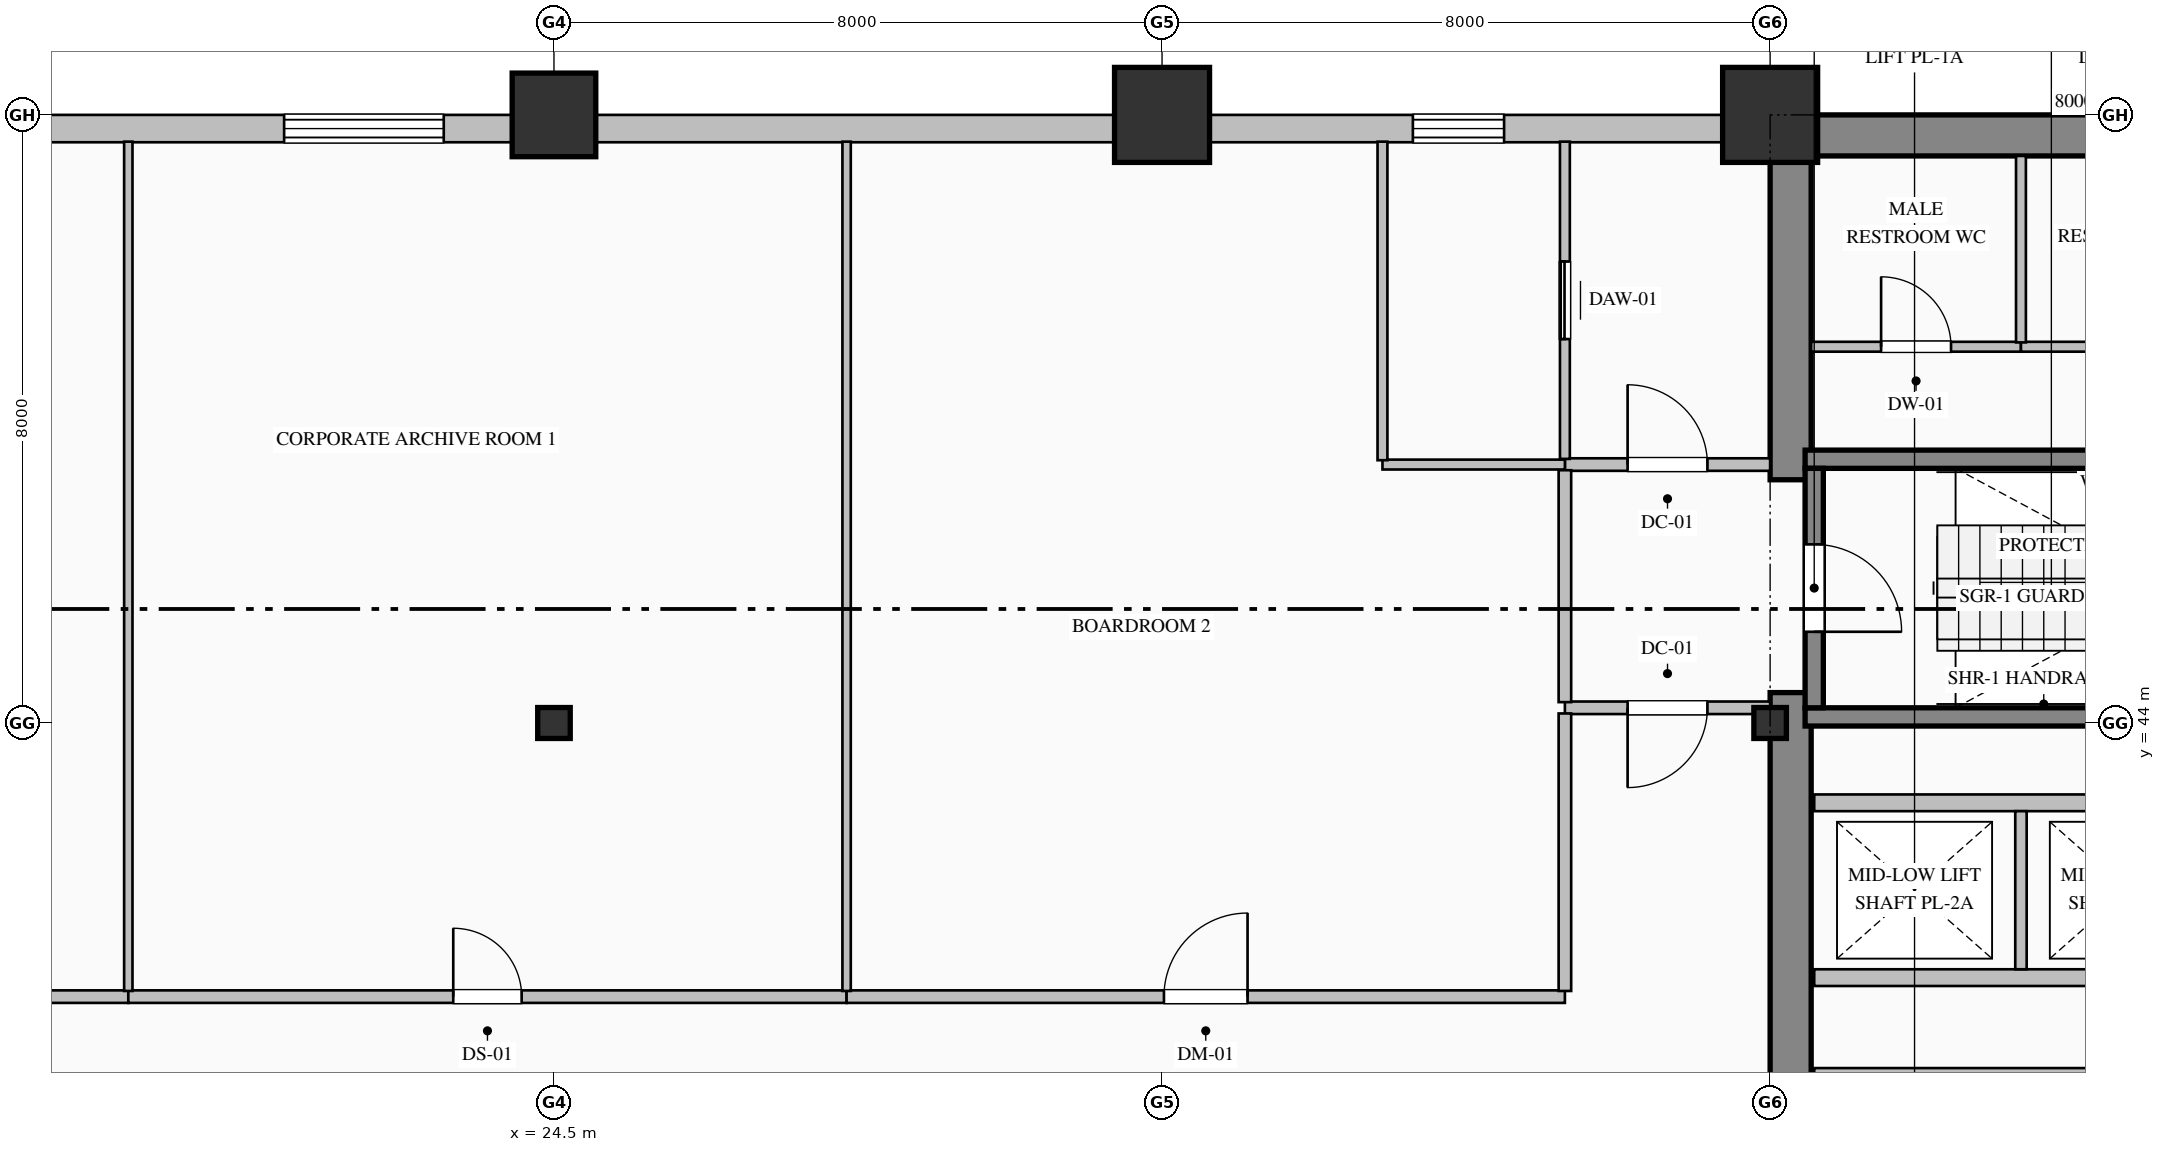
"""IFC4 building model, lengths in metres.
Left out: names, types, materials, properties, quantities, classifications, styles, units other than length and angle.
Written with IfcOpenShell. Run it as: python <this file> out.ifc"""

import sys

from ifc_helpers import new_model, si_unit, direction, frame, frame_2d, origin, origin_2d, place, context, subcontext, project, spatial, rectangle, hollow_rectangle, i_section, extrude, element, fill, save


model = new_model("IFC4")
c1 = context("Model", 3, precision=1e-05, world=origin(), true_north=direction((0.0, 1.0)))
c2 = subcontext(c1, "Body", "Model", "MODEL_VIEW")
j1 = project(units=[si_unit("LENGTHUNIT", "METRE"), si_unit("PLANEANGLEUNIT", "RADIAN")], contexts=[c1])
p1 = place(None, origin())
s1 = spatial("IfcSite", under=j1, at=p1, CompositionType="ELEMENT")
p2 = place(p1, origin())
s2 = spatial("IfcBuilding", under=s1, at=p2, CompositionType="ELEMENT")
p3 = place(p2, frame((0.0, 0.0, 104.2)))
s3 = spatial("IfcBuildingStorey", under=s2, at=p3, CompositionType="ELEMENT", Elevation=104.2)
p4 = place(p3, frame((40.5, 51.73, 0.0), z_axis=(0.0, 0.0, 1.0), x_axis=(1.0, 0.0, 0.0)))
e1 = element("IfcWall", 1, at=p4, inside=s3, PredefinedType="SHEAR", context=c2, shape_type="SweptSolid", body=[
    extrude(rectangle(XDim=23.5, YDim=0.54, at=frame_2d((11.75, 0.0))), origin(), (0.0, 0.0, 1.0), 3.65),
])
p5 = place(p3, frame((40.77, 36.54, 0.0), z_axis=(0.0, 0.0, 1.0), x_axis=(0.0, 1.0, 0.0)))
e2 = element("IfcWall", 2, at=p5, inside=s3, PredefinedType="SHEAR", context=c2, shape_type="SweptSolid", body=[
    extrude(rectangle(XDim=7.86, YDim=0.54, at=frame_2d((3.93, 0.0))), origin(), (0.0, 0.0, 1.0), 3.65),
])
p6 = place(p3, frame((40.77, 47.2, 0.0), z_axis=(0.0, 0.0, 1.0), x_axis=(0.0, 1.0, 0.0)))
e3 = element("IfcWall", 3, at=p6, inside=s3, PredefinedType="SHEAR", context=c2, shape_type="SweptSolid", body=[
    extrude(rectangle(XDim=4.26, YDim=0.54, at=frame_2d((2.13, 0.0))), origin(), (0.0, 0.0, 1.0), 3.65),
])
p7 = place(p3, frame((24.5, 44.0, 0.0), z_axis=(0.0, 0.0, 1.0), x_axis=(1.0, 0.0, 0.0)))
e4 = element("IfcColumn", 4, at=p7, inside=s3, PredefinedType="COLUMN", context=c2, shape_type="SweptSolid", body=[
    extrude(i_section(OverallWidth=0.407, OverallDepth=0.428, WebThickness=0.02, FlangeThickness=0.035, FilletRadius=0.022, at=origin_2d()), origin(), (0.0, 0.0, 1.0), 4.0),
])
p8 = place(p3, frame((24.5, 52.0, 0.0), z_axis=(0.0, 0.0, 1.0), x_axis=(1.0, 0.0, 0.0)))
e5 = element("IfcColumn", 5, at=p8, inside=s3, PredefinedType="COLUMN", context=c2, shape_type="SweptSolid", body=[
    extrude(hollow_rectangle(XDim=1.1, YDim=1.1, WallThickness=0.04, at=origin_2d()), origin(), (0.0, 0.0, 1.0), 4.0),
])
p9 = place(p3, frame((32.5, 52.0, 0.0), z_axis=(0.0, 0.0, 1.0), x_axis=(1.0, 0.0, 0.0)))
e6 = element("IfcColumn", 6, at=p9, inside=s3, PredefinedType="COLUMN", context=c2, shape_type="SweptSolid", body=[
    extrude(hollow_rectangle(XDim=1.25, YDim=1.25, WallThickness=0.045, at=origin_2d()), origin(), (0.0, 0.0, 1.0), 4.0),
])
p10 = place(p3, frame((40.5, 44.0, 0.0), z_axis=(0.0, 0.0, 1.0), x_axis=(1.0, 0.0, 0.0)))
e7 = element("IfcColumn", 7, at=p10, inside=s3, PredefinedType="COLUMN", context=c2, shape_type="SweptSolid", body=[
    extrude(i_section(OverallWidth=0.407, OverallDepth=0.428, WebThickness=0.02, FlangeThickness=0.035, FilletRadius=0.022, at=origin_2d()), origin(), (0.0, 0.0, 1.0), 4.0),
])
p11 = place(p3, frame((40.5, 52.0, 0.0), z_axis=(0.0, 0.0, 1.0), x_axis=(1.0, 0.0, 0.0)))
e8 = element("IfcColumn", 8, at=p11, inside=s3, PredefinedType="COLUMN", context=c2, shape_type="SweptSolid", body=[
    extrude(hollow_rectangle(XDim=1.25, YDim=1.25, WallThickness=0.045, at=origin_2d()), origin(), (0.0, 0.0, 1.0), 4.0),
])
p12 = place(p3, frame((4.0, 51.82, 0.0), z_axis=(0.0, 0.0, 1.0), x_axis=(1.0, 0.0, 0.0)))
e9 = element("IfcWall", 9, at=p12, inside=s3, PredefinedType="SOLIDWALL", context=c2, shape_type="SweptSolid", body=[
    extrude(rectangle(XDim=36.52, YDim=0.36, at=frame_2d((18.26, 0.0))), origin(), (0.0, 0.0, 1.0), 3.15),
])
p13 = place(p12, frame((6.15, 0.0, 0.85)))
e10 = element("IfcOpeningElement", 10, at=p13, cuts=e9, PredefinedType="OPENING", context=c2, shape_type="SweptSolid", body=[
    extrude(rectangle(XDim=2.1, YDim=2.05, at=frame_2d((1.05, 1.025))), frame((0.0, 0.19, 0.0), z_axis=(0.0, -1.0, 0.0), x_axis=(1.0, 0.0, 0.0)), (0.0, 0.0, 1.0), 0.38),
])
p14 = place(p12, frame((10.2, 0.0, 0.7)))
e11 = element("IfcOpeningElement", 11, at=p14, cuts=e9, PredefinedType="OPENING", context=c2, shape_type="SweptSolid", body=[
    extrude(rectangle(XDim=1.2, YDim=1.85, at=frame_2d((0.6, 0.925))), frame((0.0, 0.19, 0.0), z_axis=(0.0, -1.0, 0.0), x_axis=(1.0, 0.0, 0.0)), (0.0, 0.0, 1.0), 0.38),
])
p15 = place(p12, frame((16.95, 0.0, 0.85)))
e12 = element("IfcOpeningElement", 12, at=p15, cuts=e9, PredefinedType="OPENING", context=c2, shape_type="SweptSolid", body=[
    extrude(rectangle(XDim=2.1, YDim=2.05, at=frame_2d((1.05, 1.025))), frame((0.0, 0.19, 0.0), z_axis=(0.0, -1.0, 0.0), x_axis=(1.0, 0.0, 0.0)), (0.0, 0.0, 1.0), 0.38),
])
p16 = place(p12, frame((31.8, 0.0, 0.7)))
e13 = element("IfcOpeningElement", 13, at=p16, cuts=e9, PredefinedType="OPENING", context=c2, shape_type="SweptSolid", body=[
    extrude(rectangle(XDim=1.2, YDim=1.85, at=frame_2d((0.6, 0.925))), frame((0.0, 0.19, 0.0), z_axis=(0.0, -1.0, 0.0), x_axis=(1.0, 0.0, 0.0)), (0.0, 0.0, 1.0), 0.38),
])
for number, where, z_axis, x_axis in (
    (14, (40.96, 47.47, 0.0), (0.0, 0.0, 1.0), (1.0, 0.0, 0.0)),
    (15, (49.04, 44.08, 0.0), (0.0, 0.0, 1.0), (-1.0, 0.0, 0.0)),
):
    element("IfcWall", number, at=place(p3, frame(where, z_axis=z_axis, x_axis=x_axis)), inside=s3, PredefinedType="SOLIDWALL", context=c2, shape_type="SweptSolid", body=[
        extrude(rectangle(XDim=8.08, YDim=0.24, at=frame_2d((4.04, 0.0))), origin(), (0.0, 0.0, 1.0), 4.0),
    ])
p17 = place(p3, frame((41.08, 47.35, 0.0), z_axis=(0.0, 0.0, 1.0), x_axis=(0.0, -1.0, 0.0)))
e16 = element("IfcWall", 16, at=p17, inside=s3, PredefinedType="SOLIDWALL", context=c2, shape_type="SweptSolid", body=[
    extrude(rectangle(XDim=3.15, YDim=0.24, at=frame_2d((1.575, 0.0))), origin(), (0.0, 0.0, 1.0), 4.0),
])
p18 = place(p17, frame((1.0, 0.0, 0.0)))
e17 = element("IfcOpeningElement", 17, at=p18, cuts=e16, PredefinedType="OPENING", context=c2, shape_type="SweptSolid", body=[
    extrude(rectangle(XDim=1.15, YDim=2.2, at=frame_2d((0.575, 1.1))), frame((0.0, 0.13, 0.0), z_axis=(0.0, -1.0, 0.0), x_axis=(1.0, 0.0, 0.0)), (0.0, 0.0, 1.0), 0.26),
])
for number, where, z_axis, x_axis in (
    (18, (41.08, 39.35, 0.0), (0.0, 0.0, 1.0), (1.0, 0.0, 0.0)),
    (19, (49.32, 40.65, 0.0), (0.0, 0.0, 1.0), (-1.0, 0.0, 0.0)),
    (20, (41.08, 42.95, 0.0), (0.0, 0.0, 1.0), (1.0, 0.0, 0.0)),
):
    element("IfcWall", number, at=place(p3, frame(where, z_axis=z_axis, x_axis=x_axis)), inside=s3, PredefinedType="PARTITIONING", context=c2, shape_type="SweptSolid", body=[
        extrude(rectangle(XDim=8.24, YDim=0.22, at=frame_2d((4.12, 0.0))), origin(), (0.0, 0.0, 1.0), 3.65),
    ])
p19 = place(p3, frame((43.8, 40.76, 0.0), z_axis=(0.0, 0.0, 1.0), x_axis=(0.0, 1.0, 0.0)))
e21 = element("IfcWall", 21, at=p19, inside=s3, PredefinedType="PARTITIONING", context=c2, shape_type="SweptSolid", body=[
    extrude(rectangle(XDim=2.08, YDim=0.15, at=frame_2d((1.04, 0.0))), origin(), (0.0, 0.0, 1.0), 3.65),
])
p20 = place(p3, frame((37.8, 47.4, 0.0), z_axis=(0.0, 0.0, 1.0), x_axis=(1.0, 0.0, 0.0)))
e22 = element("IfcWall", 22, at=p20, inside=s3, PredefinedType="PARTITIONING", context=c2, shape_type="SweptSolid", body=[
    extrude(rectangle(XDim=2.7, YDim=0.165, at=frame_2d((1.35, 0.0))), origin(), (0.0, 0.0, 1.0), 3.65),
])
p21 = place(p20, frame((0.825, 0.0, 0.0)))
e23 = element("IfcOpeningElement", 23, at=p21, cuts=e22, PredefinedType="OPENING", context=c2, shape_type="SweptSolid", body=[
    extrude(rectangle(XDim=1.05, YDim=2.15, at=frame_2d((0.525, 1.075))), frame((0.0, 0.093, 0.0), z_axis=(0.0, -1.0, 0.0), x_axis=(1.0, 0.0, 0.0)), (0.0, 0.0, 1.0), 0.185),
])
p22 = place(p3, frame((40.5, 44.2, 0.0), z_axis=(0.0, 0.0, 1.0), x_axis=(-1.0, 0.0, 0.0)))
e24 = element("IfcWall", 24, at=p22, inside=s3, PredefinedType="PARTITIONING", context=c2, shape_type="SweptSolid", body=[
    extrude(rectangle(XDim=2.7, YDim=0.165, at=frame_2d((1.35, 0.0))), origin(), (0.0, 0.0, 1.0), 3.65),
])
p23 = place(p22, frame((0.825, 0.0, 0.0)))
e25 = element("IfcOpeningElement", 25, at=p23, cuts=e24, PredefinedType="OPENING", context=c2, shape_type="SweptSolid", body=[
    extrude(rectangle(XDim=1.05, YDim=2.15, at=frame_2d((0.525, 1.075))), frame((0.0, 0.093, 0.0), z_axis=(0.0, -1.0, 0.0), x_axis=(1.0, 0.0, 0.0)), (0.0, 0.0, 1.0), 0.185),
])
p24 = place(p3, frame((37.8, 44.274, 0.0), z_axis=(0.0, 0.0, 1.0), x_axis=(0.0, 1.0, 0.0)))
e26 = element("IfcWall", 26, at=p24, inside=s3, PredefinedType="PARTITIONING", context=c2, shape_type="SweptSolid", body=[
    extrude(rectangle(XDim=3.051, YDim=0.165, at=frame_2d((1.525, 0.0))), origin(), (0.0, 0.0, 1.0), 3.65),
])
p25 = place(p3, frame((37.8, 47.475, 0.0), z_axis=(0.0, 0.0, 1.0), x_axis=(0.0, 1.0, 0.0)))
e27 = element("IfcWall", 27, at=p25, inside=s3, PredefinedType="PARTITIONING", context=c2, shape_type="SweptSolid", body=[
    extrude(rectangle(XDim=4.173, YDim=0.13, at=frame_2d((2.087, 0.0))), origin(), (0.0, 0.0, 1.0), 3.65),
])
p26 = place(p25, frame((1.577, 0.0, 0.0)))
e28 = element("IfcOpeningElement", 28, at=p26, cuts=e27, PredefinedType="OPENING", context=c2, shape_type="SweptSolid", body=[
    extrude(rectangle(XDim=1.02, YDim=2.15, at=frame_2d((0.51, 1.075))), frame((0.0, 0.075, 0.0), z_axis=(0.0, -1.0, 0.0), x_axis=(1.0, 0.0, 0.0)), (0.0, 0.0, 1.0), 0.15),
])
p27 = place(p3, frame((37.8, 47.4, 0.0), z_axis=(0.0, 0.0, 1.0), x_axis=(-1.0, 0.0, 0.0)))
e29 = element("IfcWall", 29, at=p27, inside=s3, PredefinedType="PARTITIONING", context=c2, shape_type="SweptSolid", body=[
    extrude(rectangle(XDim=2.4, YDim=0.13, at=frame_2d((1.2, 0.0))), origin(), (0.0, 0.0, 1.0), 3.65),
])
p28 = place(p3, frame((35.4, 47.457, 0.0), z_axis=(0.0, 0.0, 1.0), x_axis=(0.0, 1.0, 0.0)))
e30 = element("IfcWall", 30, at=p28, inside=s3, PredefinedType="PARTITIONING", context=c2, shape_type="SweptSolid", body=[
    extrude(rectangle(XDim=4.191, YDim=0.13, at=frame_2d((2.095, 0.0))), origin(), (0.0, 0.0, 1.0), 3.65),
])
p29 = place(p3, frame((41.04, 48.95, 0.0), z_axis=(0.0, 0.0, 1.0), x_axis=(1.0, 0.0, 0.0)))
e31 = element("IfcWall", 31, at=p29, inside=s3, PredefinedType="PARTITIONING", context=c2, shape_type="SweptSolid", body=[
    extrude(rectangle(XDim=2.76, YDim=0.13, at=frame_2d((1.38, 0.0))), origin(), (0.0, 0.0, 1.0), 3.65),
])
p30 = place(p29, frame((0.92, 0.0, 0.0)))
e32 = element("IfcOpeningElement", 32, at=p30, cuts=e31, PredefinedType="OPENING", context=c2, shape_type="SweptSolid", body=[
    extrude(rectangle(XDim=0.92, YDim=2.15, at=frame_2d((0.46, 1.075))), frame((0.0, 0.075, 0.0), z_axis=(0.0, -1.0, 0.0), x_axis=(1.0, 0.0, 0.0)), (0.0, 0.0, 1.0), 0.15),
])
p31 = place(p3, frame((43.8, 48.95, 0.0), z_axis=(0.0, 0.0, 1.0), x_axis=(1.0, 0.0, 0.0)))
e33 = element("IfcWall", 33, at=p31, inside=s3, PredefinedType="PARTITIONING", context=c2, shape_type="SweptSolid", body=[
    extrude(rectangle(XDim=2.8, YDim=0.13, at=frame_2d((1.4, 0.0))), origin(), (0.0, 0.0, 1.0), 3.65),
])
p32 = place(p31, frame((0.94, 0.0, 0.0)))
e34 = element("IfcOpeningElement", 34, at=p32, cuts=e33, PredefinedType="OPENING", context=c2, shape_type="SweptSolid", body=[
    extrude(rectangle(XDim=0.92, YDim=2.15, at=frame_2d((0.46, 1.075))), frame((0.0, 0.075, 0.0), z_axis=(0.0, -1.0, 0.0), x_axis=(1.0, 0.0, 0.0)), (0.0, 0.0, 1.0), 0.15),
])
p33 = place(p3, frame((43.8, 51.46, 0.0), z_axis=(0.0, 0.0, 1.0), x_axis=(0.0, -1.0, 0.0)))
e35 = element("IfcWall", 35, at=p33, inside=s3, PredefinedType="PARTITIONING", context=c2, shape_type="SweptSolid", body=[
    extrude(rectangle(XDim=2.453, YDim=0.13, at=frame_2d((1.227, 0.0))), origin(), (0.0, 0.0, 1.0), 3.65),
])
p34 = place(p3, frame((9.0, 40.4, 0.0), z_axis=(0.0, 0.0, 1.0), x_axis=(1.0, 0.0, 0.0)))
e36 = element("IfcWall", 36, at=p34, inside=s3, PredefinedType="PARTITIONING", context=c2, shape_type="SweptSolid", body=[
    extrude(rectangle(XDim=9.9, YDim=0.165, at=frame_2d((4.95, 0.0))), origin(), (0.0, 0.0, 1.0), 3.65),
])
p35 = place(p34, frame((4.45, 0.0, 0.0)))
e37 = element("IfcOpeningElement", 37, at=p35, cuts=e36, PredefinedType="OPENING", context=c2, shape_type="SweptSolid", body=[
    extrude(rectangle(XDim=1.0, YDim=2.15, at=frame_2d((0.5, 1.075))), frame((0.0, 0.093, 0.0), z_axis=(0.0, -1.0, 0.0), x_axis=(1.0, 0.0, 0.0)), (0.0, 0.0, 1.0), 0.185),
])
p36 = place(p3, frame((18.9, 40.4, 0.0), z_axis=(0.0, 0.0, 1.0), x_axis=(1.0, 0.0, 0.0)))
e38 = element("IfcWall", 38, at=p36, inside=s3, PredefinedType="PARTITIONING", context=c2, shape_type="SweptSolid", body=[
    extrude(rectangle(XDim=9.45, YDim=0.165, at=frame_2d((4.725, 0.0))), origin(), (0.0, 0.0, 1.0), 3.65),
])
p37 = place(p36, frame((4.275, 0.0, 0.0)))
e39 = element("IfcOpeningElement", 39, at=p37, cuts=e38, PredefinedType="OPENING", context=c2, shape_type="SweptSolid", body=[
    extrude(rectangle(XDim=0.9, YDim=2.15, at=frame_2d((0.45, 1.075))), frame((0.0, 0.093, 0.0), z_axis=(0.0, -1.0, 0.0), x_axis=(1.0, 0.0, 0.0)), (0.0, 0.0, 1.0), 0.185),
])
p38 = place(p3, frame((28.35, 40.4, 0.0), z_axis=(0.0, 0.0, 1.0), x_axis=(1.0, 0.0, 0.0)))
e40 = element("IfcWall", 40, at=p38, inside=s3, PredefinedType="PARTITIONING", context=c2, shape_type="SweptSolid", body=[
    extrude(rectangle(XDim=9.45, YDim=0.165, at=frame_2d((4.725, 0.0))), origin(), (0.0, 0.0, 1.0), 3.65),
])
p39 = place(p38, frame((4.175, 0.0, 0.0)))
e41 = element("IfcOpeningElement", 41, at=p39, cuts=e40, PredefinedType="OPENING", context=c2, shape_type="SweptSolid", body=[
    extrude(rectangle(XDim=1.1, YDim=2.2, at=frame_2d((0.55, 1.1))), frame((0.0, 0.093, 0.0), z_axis=(0.0, -1.0, 0.0), x_axis=(1.0, 0.0, 0.0)), (0.0, 0.0, 1.0), 0.185),
])
p40 = place(p3, frame((37.8, 40.475, 0.0), z_axis=(0.0, 0.0, 1.0), x_axis=(0.0, 1.0, 0.0)))
e42 = element("IfcWall", 42, at=p40, inside=s3, PredefinedType="PARTITIONING", context=c2, shape_type="SweptSolid", body=[
    extrude(rectangle(XDim=3.651, YDim=0.165, at=frame_2d((1.825, 0.0))), origin(), (0.0, 0.0, 1.0), 3.65),
])
for number, where, z_axis, x_axis in (
    (43, (18.9, 51.648, 0.0), (0.0, 0.0, 1.0), (0.0, -1.0, 0.0)),
    (44, (28.35, 51.648, 0.0), (0.0, 0.0, 1.0), (0.0, -1.0, 0.0)),
):
    element("IfcWall", number, at=place(p3, frame(where, z_axis=z_axis, x_axis=x_axis)), inside=s3, PredefinedType="MOVABLE", context=c2, shape_type="SweptSolid", body=[
        extrude(rectangle(XDim=11.173, YDim=0.11, at=frame_2d((5.587, 0.0))), origin(), (0.0, 0.0, 1.0), 3.65),
    ])
p41 = place(p15, origin())
e45 = element("IfcWindow", 45, at=p41, inside=s3, PartitioningType="TRIPLE_PANEL_VERTICAL", PredefinedType="WINDOW", context=c2, shape_type="SweptSolid", body=[
    extrude(rectangle(XDim=2.1, YDim=2.05, at=frame_2d((1.05, 1.025))), frame((0.0, 0.15, 0.0), z_axis=(0.0, -1.0, 0.0), x_axis=(1.0, 0.0, 0.0)), (0.0, 0.0, 1.0), 0.06),
])
fill(e12, e45)
p42 = place(p16, origin())
e46 = element("IfcWindow", 46, at=p42, inside=s3, PartitioningType="DOUBLE_PANEL_VERTICAL", PredefinedType="WINDOW", context=c2, shape_type="SweptSolid", body=[
    extrude(rectangle(XDim=1.2, YDim=1.85, at=frame_2d((0.6, 0.925))), frame((0.0, 0.15, 0.0), z_axis=(0.0, -1.0, 0.0), x_axis=(1.0, 0.0, 0.0)), (0.0, 0.0, 1.0), 0.06),
])
fill(e13, e46)
p43 = place(p18, origin())
e47 = element("IfcDoor", 47, at=p43, inside=s3, OperationType="SINGLE_SWING_RIGHT", PredefinedType="DOOR", context=c2, shape_type="SweptSolid", body=[
    extrude(rectangle(XDim=1.15, YDim=2.2, at=frame_2d((0.575, 1.1))), frame((0.0, 0.025, 0.0), z_axis=(0.0, -1.0, 0.0), x_axis=(1.0, 0.0, 0.0)), (0.0, 0.0, 1.0), 0.05),
])
fill(e17, e47)
p44 = place(p21, origin())
e48 = element("IfcDoor", 48, at=p44, inside=s3, OperationType="SINGLE_SWING_LEFT", PredefinedType="DOOR", context=c2, shape_type="SweptSolid", body=[
    extrude(rectangle(XDim=1.05, YDim=2.15, at=frame_2d((0.525, 1.075))), frame((0.0, 0.025, 0.0), z_axis=(0.0, -1.0, 0.0), x_axis=(1.0, 0.0, 0.0)), (0.0, 0.0, 1.0), 0.05),
])
fill(e23, e48)
p45 = place(p23, origin())
e49 = element("IfcDoor", 49, at=p45, inside=s3, OperationType="SINGLE_SWING_RIGHT", PredefinedType="DOOR", context=c2, shape_type="SweptSolid", body=[
    extrude(rectangle(XDim=1.05, YDim=2.15, at=frame_2d((0.525, 1.075))), frame((0.0, 0.025, 0.0), z_axis=(0.0, -1.0, 0.0), x_axis=(1.0, 0.0, 0.0)), (0.0, 0.0, 1.0), 0.05),
])
fill(e25, e49)
p46 = place(p26, origin())
e50 = element("IfcDoor", 50, at=p46, inside=s3, OperationType="SLIDING_TO_LEFT", PredefinedType="DOOR", context=c2, shape_type="SweptSolid", body=[
    extrude(rectangle(XDim=1.02, YDim=2.15, at=frame_2d((0.51, 1.075))), frame((0.0, 0.025, 0.0), z_axis=(0.0, -1.0, 0.0), x_axis=(1.0, 0.0, 0.0)), (0.0, 0.0, 1.0), 0.05),
])
fill(e28, e50)
p47 = place(p30, origin())
e51 = element("IfcDoor", 51, at=p47, inside=s3, OperationType="SINGLE_SWING_LEFT", PredefinedType="DOOR", context=c2, shape_type="SweptSolid", body=[
    extrude(rectangle(XDim=0.92, YDim=2.15, at=frame_2d((0.46, 1.075))), frame((0.0, 0.025, 0.0), z_axis=(0.0, -1.0, 0.0), x_axis=(1.0, 0.0, 0.0)), (0.0, 0.0, 1.0), 0.05),
])
fill(e32, e51)
p48 = place(p37, origin())
e52 = element("IfcDoor", 52, at=p48, inside=s3, OperationType="SINGLE_SWING_LEFT", PredefinedType="DOOR", context=c2, shape_type="SweptSolid", body=[
    extrude(rectangle(XDim=0.9, YDim=2.15, at=frame_2d((0.45, 1.075))), frame((0.0, 0.025, 0.0), z_axis=(0.0, -1.0, 0.0), x_axis=(1.0, 0.0, 0.0)), (0.0, 0.0, 1.0), 0.05),
])
fill(e39, e52)
p49 = place(p39, origin())
e53 = element("IfcDoor", 53, at=p49, inside=s3, OperationType="SINGLE_SWING_RIGHT", PredefinedType="DOOR", context=c2, shape_type="SweptSolid", body=[
    extrude(rectangle(XDim=1.1, YDim=2.2, at=frame_2d((0.55, 1.1))), frame((0.0, 0.025, 0.0), z_axis=(0.0, -1.0, 0.0), x_axis=(1.0, 0.0, 0.0)), (0.0, 0.0, 1.0), 0.05),
])
fill(e41, e53)
save(model, sys.argv[1])
